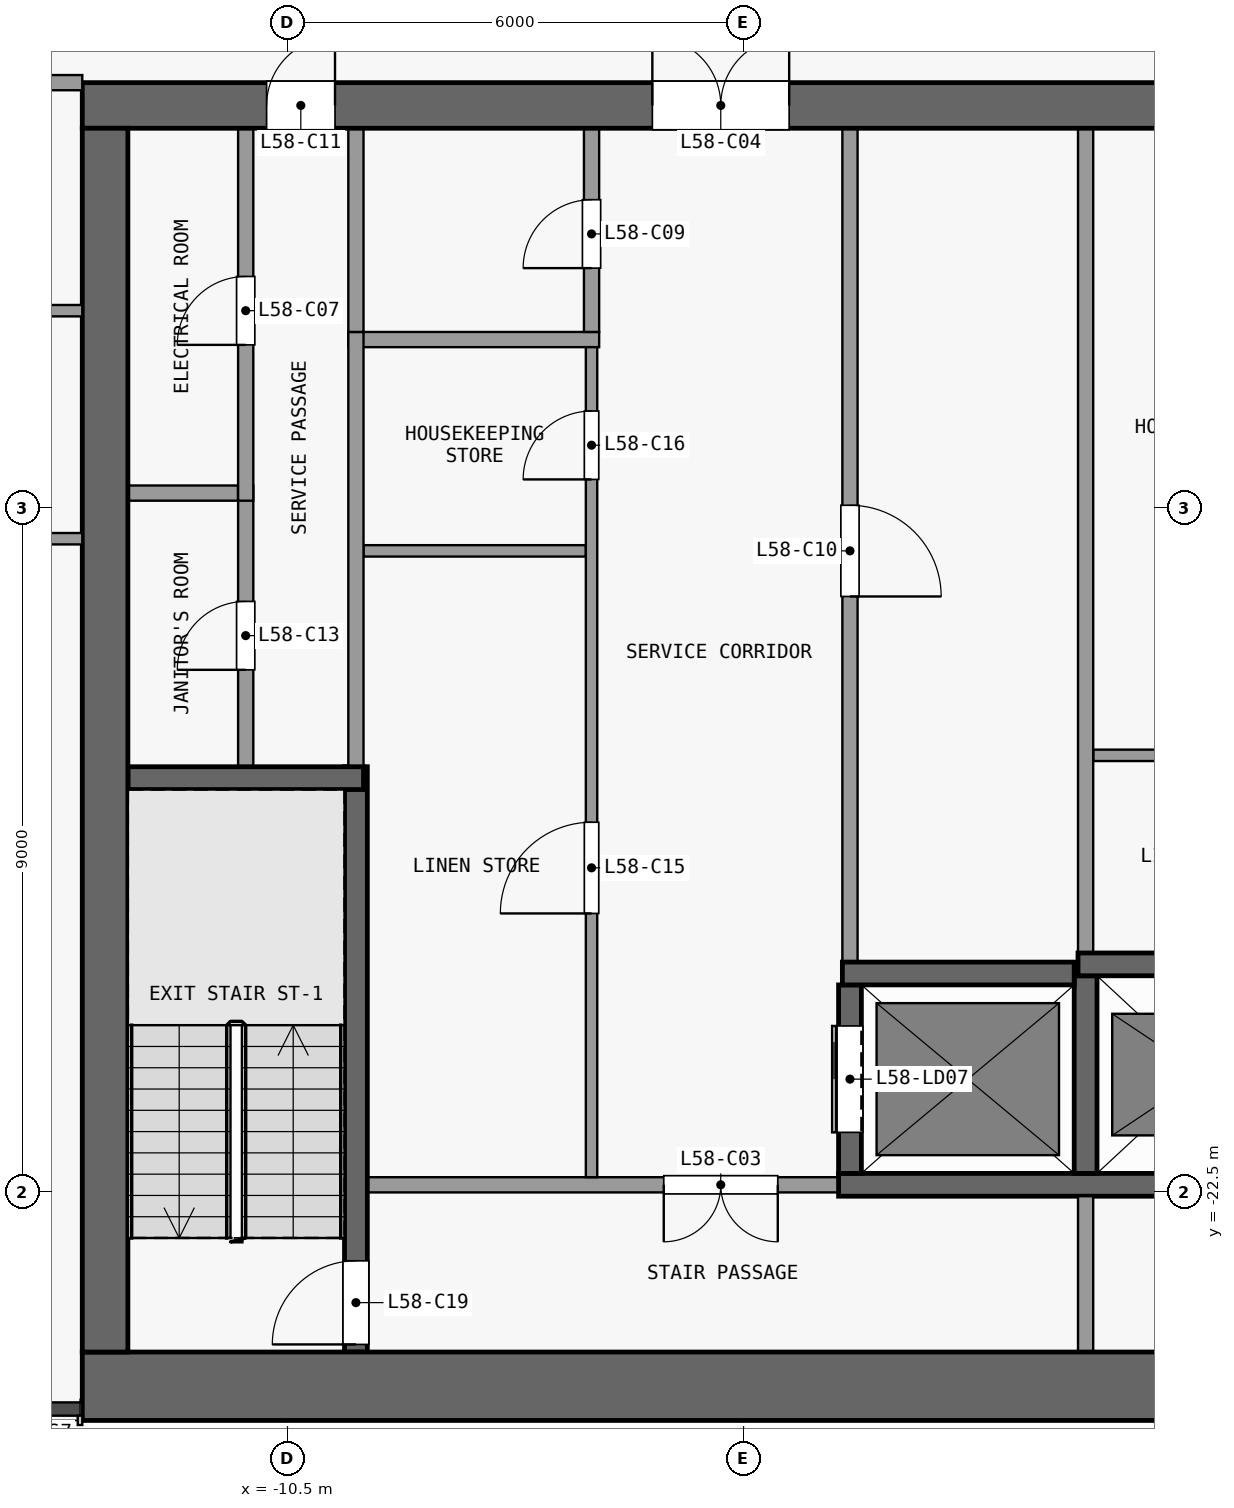
"""IFC4 building model, lengths in metres.
Left out: names, types, materials, properties, quantities, classifications, styles, units other than length and angle.
Written with IfcOpenShell. Run it as: python <this file> out.ifc"""

import sys

from ifc_helpers import new_model, si_unit, direction, frame, frame_2d, origin, place, context, subcontext, project, spatial, rectangle, extrude, element, fill, save


model = new_model("IFC4")
c1 = context("Model", 3, precision=1e-05, world=origin(), true_north=direction((0.0, 1.0)))
c2 = subcontext(c1, "Body", "Model", "MODEL_VIEW")
j1 = project(units=[si_unit("LENGTHUNIT", "METRE"), si_unit("PLANEANGLEUNIT", "RADIAN")], contexts=[c1])
p1 = place(None, origin())
s1 = spatial("IfcSite", under=j1, at=p1, CompositionType="ELEMENT")
p2 = place(p1, origin())
s2 = spatial("IfcBuilding", under=s1, at=p2, CompositionType="ELEMENT")
p3 = place(p2, frame((0.0, 0.0, 230.3)))
s3 = spatial("IfcBuildingStorey", under=s2, at=p3, CompositionType="ELEMENT", Elevation=230.3)
p4 = place(p3, frame((-13.2, -25.05, 0.0), z_axis=(0.0, 0.0, 1.0), x_axis=(1.0, 0.0, 0.0)))
e1 = element("IfcWall", 1, at=p4, inside=s3, PredefinedType="SHEAR", context=c2, shape_type="SweptSolid", body=[
    extrude(rectangle(XDim=26.4, YDim=0.9, at=frame_2d((13.2, 0.0))), origin(), (0.0, 0.0, 1.0), 3.3),
])
p5 = place(p3, frame((-13.2, -8.2, 0.0), z_axis=(0.0, 0.0, 1.0), x_axis=(1.0, 0.0, 0.0)))
e2 = element("IfcWall", 2, at=p5, inside=s3, PredefinedType="SHEAR", context=c2, shape_type="SweptSolid", body=[
    extrude(rectangle(XDim=26.4, YDim=0.6, at=frame_2d((13.2, 0.0))), origin(), (0.0, 0.0, 1.0), 3.3),
])
p6 = place(p5, frame((7.5, 0.0, 0.0)))
e3 = element("IfcOpeningElement", 3, at=p6, cuts=e2, PredefinedType="OPENING", context=c2, shape_type="SweptSolid", body=[
    extrude(rectangle(XDim=1.8, YDim=2.1, at=frame_2d((0.9, 1.05))), frame((0.0, 0.31, 0.0), z_axis=(0.0, -1.0, 0.0), x_axis=(1.0, 0.0, 0.0)), (0.0, 0.0, 1.0), 0.62),
])
p7 = place(p5, frame((17.1, 0.0, 0.0)))
e4 = element("IfcOpeningElement", 4, at=p7, cuts=e2, PredefinedType="OPENING", context=c2, shape_type="SweptSolid", body=[
    extrude(rectangle(XDim=1.8, YDim=2.1, at=frame_2d((0.9, 1.05))), frame((0.0, 0.31, 0.0), z_axis=(0.0, -1.0, 0.0), x_axis=(1.0, 0.0, 0.0)), (0.0, 0.0, 1.0), 0.62),
])
p8 = place(p5, frame((2.425, 0.0, 0.0)))
e5 = element("IfcOpeningElement", 5, at=p8, cuts=e2, PredefinedType="OPENING", context=c2, shape_type="SweptSolid", body=[
    extrude(rectangle(XDim=0.9, YDim=2.1, at=frame_2d((0.45, 1.05))), frame((0.0, 0.31, 0.0), z_axis=(0.0, -1.0, 0.0), x_axis=(1.0, 0.0, 0.0)), (0.0, 0.0, 1.0), 0.62),
])
p9 = place(p5, frame((23.075, 0.0, 0.0)))
e6 = element("IfcOpeningElement", 6, at=p9, cuts=e2, PredefinedType="OPENING", context=c2, shape_type="SweptSolid", body=[
    extrude(rectangle(XDim=0.9, YDim=2.1, at=frame_2d((0.45, 1.05))), frame((0.0, 0.31, 0.0), z_axis=(0.0, -1.0, 0.0), x_axis=(1.0, 0.0, 0.0)), (0.0, 0.0, 1.0), 0.62),
])
p10 = place(p3, frame((-12.9, -24.6, 0.0), z_axis=(0.0, 0.0, 1.0), x_axis=(0.0, 1.0, 0.0)))
e7 = element("IfcWall", 7, at=p10, inside=s3, PredefinedType="SHEAR", context=c2, shape_type="SweptSolid", body=[
    extrude(rectangle(XDim=16.1, YDim=0.6, at=frame_2d((8.05, 0.0))), origin(), (0.0, 0.0, 1.0), 3.3),
])
p11 = place(p3, frame((-3.25, -22.4, 0.0), z_axis=(0.0, 0.0, 1.0), x_axis=(-1.0, 0.0, 0.0)))
e8 = element("IfcWall", 8, at=p11, inside=s3, PredefinedType="PARTITIONING", context=c2, shape_type="SweptSolid", body=[
    extrude(rectangle(XDim=6.2, YDim=0.2, at=frame_2d((3.1, 0.0))), origin(), (0.0, 0.0, 1.0), 3.3),
])
p12 = place(p11, frame((0.8, 0.0, 0.0)))
e9 = element("IfcOpeningElement", 9, at=p12, cuts=e8, PredefinedType="OPENING", context=c2, shape_type="SweptSolid", body=[
    extrude(rectangle(XDim=1.5, YDim=2.1, at=frame_2d((0.75, 1.05))), frame((0.0, 0.11, 0.0), z_axis=(0.0, -1.0, 0.0), x_axis=(1.0, 0.0, 0.0)), (0.0, 0.0, 1.0), 0.22),
])
p13 = place(p3, frame((-3.25, -22.4, 0.0), z_axis=(0.0, 0.0, 1.0), x_axis=(1.0, 0.0, 0.0)))
e10 = element("IfcWall", 10, at=p13, inside=s3, PredefinedType="SHEAR", context=c2, shape_type="SweptSolid", body=[
    extrude(rectangle(XDim=6.5, YDim=0.3, at=frame_2d((3.25, 0.0))), origin(), (0.0, 0.0, 1.0), 3.3),
])
p14 = place(p3, frame((-3.2, -19.62, 0.0), z_axis=(0.0, 0.0, 1.0), x_axis=(1.0, 0.0, 0.0)))
e11 = element("IfcWall", 11, at=p14, inside=s3, PredefinedType="SHEAR", context=c2, shape_type="SweptSolid", body=[
    extrude(rectangle(XDim=3.05, YDim=0.3, at=frame_2d((1.525, 0.0))), origin(), (0.0, 0.0, 1.0), 3.3),
])
p15 = place(p3, frame((-0.1, -19.5, 0.0), z_axis=(0.0, 0.0, 1.0), x_axis=(1.0, 0.0, 0.0)))
e12 = element("IfcWall", 12, at=p15, inside=s3, PredefinedType="SHEAR", context=c2, shape_type="SweptSolid", body=[
    extrude(rectangle(XDim=3.275, YDim=0.3, at=frame_2d((1.638, 0.0))), origin(), (0.0, 0.0, 1.0), 3.3),
])
p16 = place(p3, frame((-12.6, -17.05, 0.0), z_axis=(0.0, 0.0, 1.0), x_axis=(1.0, 0.0, 0.0)))
e13 = element("IfcWall", 13, at=p16, inside=s3, PredefinedType="SHEAR", context=c2, shape_type="SweptSolid", body=[
    extrude(rectangle(XDim=3.1, YDim=0.3, at=frame_2d((1.55, 0.0))), origin(), (0.0, 0.0, 1.0), 3.3),
])
p17 = place(p3, frame((0.1, -16.75, 0.0), z_axis=(0.0, 0.0, 1.0), x_axis=(1.0, 0.0, 0.0)))
e14 = element("IfcWall", 14, at=p17, inside=s3, PredefinedType="PARTITIONING", context=c2, shape_type="SweptSolid", body=[
    extrude(rectangle(XDim=2.925, YDim=0.15, at=frame_2d((1.462, 0.0))), origin(), (0.0, 0.0, 1.0), 3.3),
])
p18 = place(p3, frame((-9.5, -14.06, 0.0), z_axis=(0.0, 0.0, 1.0), x_axis=(1.0, 0.0, 0.0)))
e15 = element("IfcWall", 15, at=p18, inside=s3, PredefinedType="PARTITIONING", context=c2, shape_type="SweptSolid", body=[
    extrude(rectangle(XDim=2.925, YDim=0.15, at=frame_2d((1.462, 0.0))), origin(), (0.0, 0.0, 1.0), 3.3),
])
p19 = place(p3, frame((-12.6, -13.3, 0.0), z_axis=(0.0, 0.0, 1.0), x_axis=(1.0, 0.0, 0.0)))
e16 = element("IfcWall", 16, at=p19, inside=s3, PredefinedType="PARTITIONING", context=c2, shape_type="SweptSolid", body=[
    extrude(rectangle(XDim=1.45, YDim=0.2, at=frame_2d((0.725, 0.0))), origin(), (0.0, 0.0, 1.0), 3.3),
])
p20 = place(p3, frame((-9.7, -11.28, 0.0), z_axis=(0.0, 0.0, 1.0), x_axis=(1.0, 0.0, 0.0)))
e17 = element("IfcWall", 17, at=p20, inside=s3, PredefinedType="PARTITIONING", context=c2, shape_type="SweptSolid", body=[
    extrude(rectangle(XDim=3.3, YDim=0.2, at=frame_2d((1.65, 0.0))), origin(), (0.0, 0.0, 1.0), 3.3),
])
p21 = place(p3, frame((-11.05, -16.9, 0.0), z_axis=(0.0, 0.0, 1.0), x_axis=(0.0, 1.0, 0.0)))
e18 = element("IfcWall", 18, at=p21, inside=s3, PredefinedType="PARTITIONING", context=c2, shape_type="SweptSolid", body=[
    extrude(rectangle(XDim=3.7, YDim=0.2, at=frame_2d((1.85, 0.0))), origin(), (0.0, 0.0, 1.0), 3.3),
])
p22 = place(p21, frame((1.275, 0.0, 0.0)))
e19 = element("IfcOpeningElement", 19, at=p22, cuts=e18, PredefinedType="OPENING", context=c2, shape_type="SweptSolid", body=[
    extrude(rectangle(XDim=0.9, YDim=2.1, at=frame_2d((0.45, 1.05))), frame((0.0, 0.11, 0.0), z_axis=(0.0, -1.0, 0.0), x_axis=(1.0, 0.0, 0.0)), (0.0, 0.0, 1.0), 0.22),
])
p23 = place(p3, frame((-11.05, -13.4, 0.0), z_axis=(0.0, 0.0, 1.0), x_axis=(0.0, 1.0, 0.0)))
e20 = element("IfcWall", 20, at=p23, inside=s3, PredefinedType="PARTITIONING", context=c2, shape_type="SweptSolid", body=[
    extrude(rectangle(XDim=4.9, YDim=0.2, at=frame_2d((2.45, 0.0))), origin(), (0.0, 0.0, 1.0), 3.3),
])
p24 = place(p23, frame((2.05, 0.0, 0.0)))
e21 = element("IfcOpeningElement", 21, at=p24, cuts=e20, PredefinedType="OPENING", context=c2, shape_type="SweptSolid", body=[
    extrude(rectangle(XDim=0.9, YDim=2.1, at=frame_2d((0.45, 1.05))), frame((0.0, 0.11, 0.0), z_axis=(0.0, -1.0, 0.0), x_axis=(1.0, 0.0, 0.0)), (0.0, 0.0, 1.0), 0.22),
])
p25 = place(p3, frame((-9.6, -24.6, 0.0), z_axis=(0.0, 0.0, 1.0), x_axis=(0.0, 1.0, 0.0)))
e22 = element("IfcWall", 22, at=p25, inside=s3, PredefinedType="SHEAR", context=c2, shape_type="SweptSolid", body=[
    extrude(rectangle(XDim=7.7, YDim=0.3, at=frame_2d((3.85, 0.0))), origin(), (0.0, 0.0, 1.0), 3.3),
])
p26 = place(p25, frame((0.1, 0.0, 0.0)))
e23 = element("IfcOpeningElement", 23, at=p26, cuts=e22, PredefinedType="OPENING", context=c2, shape_type="SweptSolid", body=[
    extrude(rectangle(XDim=1.1, YDim=2.1, at=frame_2d((0.55, 1.05))), frame((0.0, 0.16, 0.0), z_axis=(0.0, -1.0, 0.0), x_axis=(1.0, 0.0, 0.0)), (0.0, 0.0, 1.0), 0.32),
])
p27 = place(p3, frame((-9.6, -16.9, 0.0), z_axis=(0.0, 0.0, 1.0), x_axis=(0.0, 1.0, 0.0)))
e24 = element("IfcWall", 24, at=p27, inside=s3, PredefinedType="PARTITIONING", context=c2, shape_type="SweptSolid", body=[
    extrude(rectangle(XDim=5.72, YDim=0.2, at=frame_2d((2.86, 0.0))), origin(), (0.0, 0.0, 1.0), 3.3),
])
p28 = place(p3, frame((-9.6, -11.18, 0.0), z_axis=(0.0, 0.0, 1.0), x_axis=(0.0, 1.0, 0.0)))
e25 = element("IfcWall", 25, at=p28, inside=s3, PredefinedType="PARTITIONING", context=c2, shape_type="SweptSolid", body=[
    extrude(rectangle(XDim=2.68, YDim=0.2, at=frame_2d((1.34, 0.0))), origin(), (0.0, 0.0, 1.0), 3.3),
])
p29 = place(p3, frame((-6.5, -22.3, 0.0), z_axis=(0.0, 0.0, 1.0), x_axis=(0.0, 1.0, 0.0)))
e26 = element("IfcWall", 26, at=p29, inside=s3, PredefinedType="PARTITIONING", context=c2, shape_type="SweptSolid", body=[
    extrude(rectangle(XDim=10.92, YDim=0.15, at=frame_2d((5.46, 0.0))), origin(), (0.0, 0.0, 1.0), 3.3),
])
p30 = place(p29, frame((3.47, 0.0, 0.0)))
e27 = element("IfcOpeningElement", 27, at=p30, cuts=e26, PredefinedType="OPENING", context=c2, shape_type="SweptSolid", body=[
    extrude(rectangle(XDim=1.2, YDim=2.1, at=frame_2d((0.6, 1.05))), frame((0.0, 0.085, 0.0), z_axis=(0.0, -1.0, 0.0), x_axis=(1.0, 0.0, 0.0)), (0.0, 0.0, 1.0), 0.17),
])
p31 = place(p29, frame((9.18, 0.0, 0.0)))
e28 = element("IfcOpeningElement", 28, at=p31, cuts=e26, PredefinedType="OPENING", context=c2, shape_type="SweptSolid", body=[
    extrude(rectangle(XDim=0.9, YDim=2.1, at=frame_2d((0.45, 1.05))), frame((0.0, 0.085, 0.0), z_axis=(0.0, -1.0, 0.0), x_axis=(1.0, 0.0, 0.0)), (0.0, 0.0, 1.0), 0.17),
])
p32 = place(p3, frame((-6.5, -11.18, 0.0), z_axis=(0.0, 0.0, 1.0), x_axis=(0.0, 1.0, 0.0)))
e29 = element("IfcWall", 29, at=p32, inside=s3, PredefinedType="PARTITIONING", context=c2, shape_type="SweptSolid", body=[
    extrude(rectangle(XDim=2.68, YDim=0.2, at=frame_2d((1.34, 0.0))), origin(), (0.0, 0.0, 1.0), 3.3),
])
p33 = place(p32, frame((0.84, 0.0, 0.0)))
e30 = element("IfcOpeningElement", 30, at=p33, cuts=e29, PredefinedType="OPENING", context=c2, shape_type="SweptSolid", body=[
    extrude(rectangle(XDim=0.9, YDim=2.1, at=frame_2d((0.45, 1.05))), frame((0.0, 0.11, 0.0), z_axis=(0.0, -1.0, 0.0), x_axis=(1.0, 0.0, 0.0)), (0.0, 0.0, 1.0), 0.22),
])
p34 = place(p3, frame((-3.1, -22.25, 0.0), z_axis=(0.0, 0.0, 1.0), x_axis=(0.0, 1.0, 0.0)))
e31 = element("IfcWall", 31, at=p34, inside=s3, PredefinedType="SHEAR", context=c2, shape_type="SweptSolid", body=[
    extrude(rectangle(XDim=2.48, YDim=0.3, at=frame_2d((1.24, 0.0))), origin(), (0.0, 0.0, 1.0), 3.3),
])
p35 = place(p34, frame((0.54, 0.0, 0.0)))
e32 = element("IfcOpeningElement", 32, at=p35, cuts=e31, PredefinedType="OPENING", context=c2, shape_type="SweptSolid", body=[
    extrude(rectangle(XDim=1.4, YDim=2.1, at=frame_2d((0.7, 1.05))), frame((0.0, 0.16, 0.0), z_axis=(0.0, -1.0, 0.0), x_axis=(1.0, 0.0, 0.0)), (0.0, 0.0, 1.0), 0.32),
])
p36 = place(p3, frame((-3.1, -8.5, 0.0), z_axis=(0.0, 0.0, 1.0), x_axis=(0.0, -1.0, 0.0)))
e33 = element("IfcWall", 33, at=p36, inside=s3, PredefinedType="PARTITIONING", context=c2, shape_type="SweptSolid", body=[
    extrude(rectangle(XDim=10.97, YDim=0.2, at=frame_2d((5.485, 0.0))), origin(), (0.0, 0.0, 1.0), 3.3),
])
p37 = place(p36, frame((4.96, 0.0, 0.0)))
e34 = element("IfcOpeningElement", 34, at=p37, cuts=e33, PredefinedType="OPENING", context=c2, shape_type="SweptSolid", body=[
    extrude(rectangle(XDim=1.2, YDim=2.1, at=frame_2d((0.6, 1.05))), frame((0.0, 0.11, 0.0), z_axis=(0.0, -1.0, 0.0), x_axis=(1.0, 0.0, 0.0)), (0.0, 0.0, 1.0), 0.22),
])
p38 = place(p3, frame((0.0, -24.6, 0.0), z_axis=(0.0, 0.0, 1.0), x_axis=(0.0, 1.0, 0.0)))
e35 = element("IfcWall", 35, at=p38, inside=s3, PredefinedType="PARTITIONING", context=c2, shape_type="SweptSolid", body=[
    extrude(rectangle(XDim=2.05, YDim=0.2, at=frame_2d((1.025, 0.0))), origin(), (0.0, 0.0, 1.0), 3.3),
])
p39 = place(p3, frame((0.0, -22.25, 0.0), z_axis=(0.0, 0.0, 1.0), x_axis=(0.0, 1.0, 0.0)))
e36 = element("IfcWall", 36, at=p39, inside=s3, PredefinedType="SHEAR", context=c2, shape_type="SweptSolid", body=[
    extrude(rectangle(XDim=2.6, YDim=0.3, at=frame_2d((1.3, 0.0))), origin(), (0.0, 0.0, 1.0), 3.3),
])
p40 = place(p3, frame((0.0, -19.35, 0.0), z_axis=(0.0, 0.0, 1.0), x_axis=(0.0, 1.0, 0.0)))
e37 = element("IfcWall", 37, at=p40, inside=s3, PredefinedType="PARTITIONING", context=c2, shape_type="SweptSolid", body=[
    extrude(rectangle(XDim=10.85, YDim=0.2, at=frame_2d((5.425, 0.0))), origin(), (0.0, 0.0, 1.0), 3.3),
])
p41 = place(p3, frame((-19.262, -13.9, 0.0), z_axis=(0.0, 0.0, 1.0), x_axis=(1.0, 0.0, 0.0)))
e38 = element("IfcWall", 38, at=p41, inside=s3, PredefinedType="PARTITIONING", context=c2, shape_type="SweptSolid", body=[
    extrude(rectangle(XDim=6.062, YDim=0.15, at=frame_2d((3.031, 0.0))), origin(), (0.0, 0.0, 1.0), 3.3),
])
p42 = place(p41, frame((4.162, 0.0, 0.0)))
e39 = element("IfcOpeningElement", 39, at=p42, cuts=e38, PredefinedType="OPENING", context=c2, shape_type="SweptSolid", body=[
    extrude(rectangle(XDim=0.9, YDim=2.1, at=frame_2d((0.45, 1.05))), frame((0.0, 0.085, 0.0), z_axis=(0.0, -1.0, 0.0), x_axis=(1.0, 0.0, 0.0)), (0.0, 0.0, 1.0), 0.17),
])
p43 = place(p3, frame((-17.85, -10.9, 0.0), z_axis=(0.0, 0.0, 1.0), x_axis=(1.0, 0.0, 0.0)))
e40 = element("IfcWall", 40, at=p43, inside=s3, PredefinedType="PARTITIONING", context=c2, shape_type="SweptSolid", body=[
    extrude(rectangle(XDim=4.65, YDim=0.15, at=frame_2d((2.325, 0.0))), origin(), (0.0, 0.0, 1.0), 3.3),
])
p44 = place(p43, frame((0.4, 0.0, 0.0)))
e41 = element("IfcOpeningElement", 41, at=p44, cuts=e40, PredefinedType="OPENING", context=c2, shape_type="SweptSolid", body=[
    extrude(rectangle(XDim=0.9, YDim=2.1, at=frame_2d((0.45, 1.05))), frame((0.0, 0.085, 0.0), z_axis=(0.0, -1.0, 0.0), x_axis=(1.0, 0.0, 0.0)), (0.0, 0.0, 1.0), 0.17),
])
p45 = place(p43, frame((2.75, 0.0, 0.0)))
e42 = element("IfcOpeningElement", 42, at=p45, cuts=e40, PredefinedType="OPENING", context=c2, shape_type="SweptSolid", body=[
    extrude(rectangle(XDim=0.9, YDim=2.1, at=frame_2d((0.45, 1.05))), frame((0.0, 0.085, 0.0), z_axis=(0.0, -1.0, 0.0), x_axis=(1.0, 0.0, 0.0)), (0.0, 0.0, 1.0), 0.17),
])
p46 = place(p3, frame((-17.85, -7.9, 0.0), z_axis=(0.0, 0.0, 1.0), x_axis=(1.0, 0.0, 0.0)))
e43 = element("IfcWall", 43, at=p46, inside=s3, PredefinedType="PARTITIONING", context=c2, shape_type="SweptSolid", body=[
    extrude(rectangle(XDim=4.65, YDim=0.2, at=frame_2d((2.325, 0.0))), origin(), (0.0, 0.0, 1.0), 3.3),
])
p47 = place(p46, frame((1.8, 0.0, 0.0)))
e44 = element("IfcOpeningElement", 44, at=p47, cuts=e43, PredefinedType="OPENING", context=c2, shape_type="SweptSolid", body=[
    extrude(rectangle(XDim=1.0, YDim=2.1, at=frame_2d((0.5, 1.05))), frame((0.0, 0.11, 0.0), z_axis=(0.0, -1.0, 0.0), x_axis=(1.0, 0.0, 0.0)), (0.0, 0.0, 1.0), 0.22),
])
p48 = place(p35, origin())
e45 = element("IfcDoor", 45, at=p48, inside=s3, OperationType="DOUBLE_DOOR_SLIDING", PredefinedType="DOOR", context=c2, shape_type="SweptSolid", body=[
    extrude(rectangle(XDim=1.4, YDim=2.1, at=frame_2d((0.7, 1.05))), frame((0.0, 0.025, 0.0), z_axis=(0.0, -1.0, 0.0), x_axis=(1.0, 0.0, 0.0)), (0.0, 0.0, 1.0), 0.05),
])
fill(e32, e45)
p49 = place(p12, origin())
e46 = element("IfcDoor", 46, at=p49, inside=s3, OperationType="DOUBLE_DOOR_SINGLE_SWING", PredefinedType="DOOR", context=c2, shape_type="SweptSolid", body=[
    extrude(rectangle(XDim=1.5, YDim=2.1, at=frame_2d((0.75, 1.05))), frame((0.0, 0.025, 0.0), z_axis=(0.0, -1.0, 0.0), x_axis=(1.0, 0.0, 0.0)), (0.0, 0.0, 1.0), 0.05),
])
fill(e9, e46)
p50 = place(p6, origin())
e47 = element("IfcDoor", 47, at=p50, inside=s3, OperationType="DOUBLE_DOOR_SINGLE_SWING", PredefinedType="DOOR", context=c2, shape_type="SweptSolid", body=[
    extrude(rectangle(XDim=1.8, YDim=2.1, at=frame_2d((0.9, 1.05))), frame((0.0, 0.025, 0.0), z_axis=(0.0, -1.0, 0.0), x_axis=(1.0, 0.0, 0.0)), (0.0, 0.0, 1.0), 0.05),
])
fill(e3, e47)
p51 = place(p24, origin())
e48 = element("IfcDoor", 48, at=p51, inside=s3, OperationType="SINGLE_SWING_LEFT", PredefinedType="DOOR", context=c2, shape_type="SweptSolid", body=[
    extrude(rectangle(XDim=0.9, YDim=2.1, at=frame_2d((0.45, 1.05))), frame((0.0, 0.025, 0.0), z_axis=(0.0, -1.0, 0.0), x_axis=(1.0, 0.0, 0.0)), (0.0, 0.0, 1.0), 0.05),
])
fill(e21, e48)
p52 = place(p33, origin())
e49 = element("IfcDoor", 49, at=p52, inside=s3, OperationType="SINGLE_SWING_LEFT", PredefinedType="DOOR", context=c2, shape_type="SweptSolid", body=[
    extrude(rectangle(XDim=0.9, YDim=2.1, at=frame_2d((0.45, 1.05))), frame((0.0, 0.025, 0.0), z_axis=(0.0, -1.0, 0.0), x_axis=(1.0, 0.0, 0.0)), (0.0, 0.0, 1.0), 0.05),
])
fill(e30, e49)
p53 = place(p37, origin())
e50 = element("IfcDoor", 50, at=p53, inside=s3, OperationType="SINGLE_SWING_RIGHT", PredefinedType="DOOR", context=c2, shape_type="SweptSolid", body=[
    extrude(rectangle(XDim=1.2, YDim=2.1, at=frame_2d((0.6, 1.05))), frame((0.0, 0.025, 0.0), z_axis=(0.0, -1.0, 0.0), x_axis=(1.0, 0.0, 0.0)), (0.0, 0.0, 1.0), 0.05),
])
fill(e34, e50)
p54 = place(p8, origin())
e51 = element("IfcDoor", 51, at=p54, inside=s3, OperationType="SINGLE_SWING_RIGHT", PredefinedType="DOOR", context=c2, shape_type="SweptSolid", body=[
    extrude(rectangle(XDim=0.9, YDim=2.1, at=frame_2d((0.45, 1.05))), frame((0.0, 0.025, 0.0), z_axis=(0.0, -1.0, 0.0), x_axis=(1.0, 0.0, 0.0)), (0.0, 0.0, 1.0), 0.05),
])
fill(e5, e51)
p55 = place(p22, origin())
e52 = element("IfcDoor", 52, at=p55, inside=s3, OperationType="SINGLE_SWING_LEFT", PredefinedType="DOOR", context=c2, shape_type="SweptSolid", body=[
    extrude(rectangle(XDim=0.9, YDim=2.1, at=frame_2d((0.45, 1.05))), frame((0.0, 0.025, 0.0), z_axis=(0.0, -1.0, 0.0), x_axis=(1.0, 0.0, 0.0)), (0.0, 0.0, 1.0), 0.05),
])
fill(e19, e52)
p56 = place(p30, origin())
e53 = element("IfcDoor", 53, at=p56, inside=s3, OperationType="SINGLE_SWING_LEFT", PredefinedType="DOOR", context=c2, shape_type="SweptSolid", body=[
    extrude(rectangle(XDim=1.2, YDim=2.1, at=frame_2d((0.6, 1.05))), frame((0.0, 0.025, 0.0), z_axis=(0.0, -1.0, 0.0), x_axis=(1.0, 0.0, 0.0)), (0.0, 0.0, 1.0), 0.05),
])
fill(e27, e53)
p57 = place(p31, origin())
e54 = element("IfcDoor", 54, at=p57, inside=s3, OperationType="SINGLE_SWING_LEFT", PredefinedType="DOOR", context=c2, shape_type="SweptSolid", body=[
    extrude(rectangle(XDim=0.9, YDim=2.1, at=frame_2d((0.45, 1.05))), frame((0.0, 0.025, 0.0), z_axis=(0.0, -1.0, 0.0), x_axis=(1.0, 0.0, 0.0)), (0.0, 0.0, 1.0), 0.05),
])
fill(e28, e54)
p58 = place(p26, origin())
e55 = element("IfcDoor", 55, at=p58, inside=s3, OperationType="SINGLE_SWING_LEFT", PredefinedType="DOOR", context=c2, shape_type="SweptSolid", body=[
    extrude(rectangle(XDim=1.1, YDim=2.1, at=frame_2d((0.55, 1.05))), frame((0.0, 0.025, 0.0), z_axis=(0.0, -1.0, 0.0), x_axis=(1.0, 0.0, 0.0)), (0.0, 0.0, 1.0), 0.05),
])
fill(e23, e55)
save(model, sys.argv[1])
